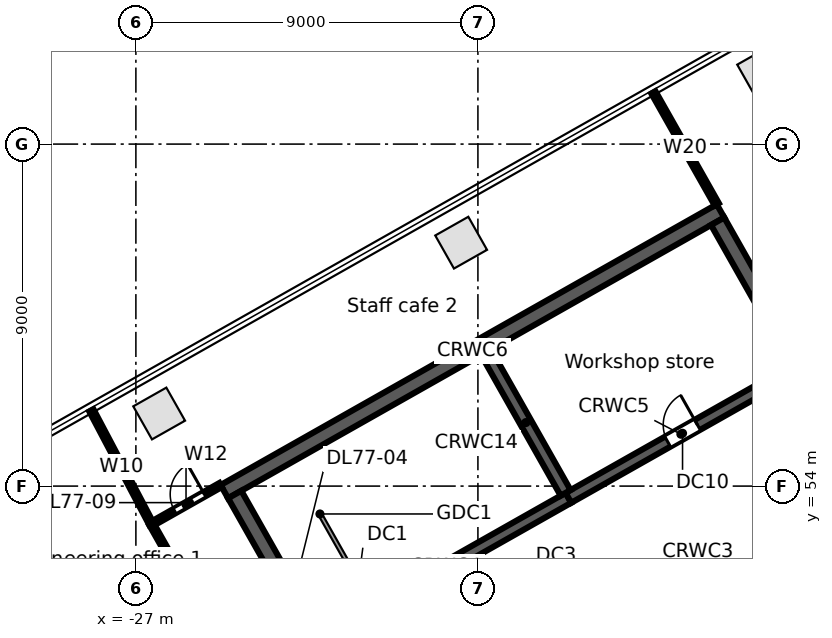
"""IFC4 building model, lengths in metres.
Left out: names, types, materials, properties, quantities, classifications, styles, units other than length and angle.
Written with IfcOpenShell. Run it as: python <this file> out.ifc"""

import sys

from ifc_helpers import new_model, si_unit, direction, frame, frame_2d, origin, origin_2d, place, context, subcontext, project, spatial, rectangle, extrude, element, fill, save


model = new_model("IFC4")
c1 = context("Model", 3, precision=1e-05, world=origin(), true_north=direction((0.0, 1.0)))
c2 = subcontext(c1, "Body", "Model", "MODEL_VIEW")
j1 = project(units=[si_unit("LENGTHUNIT", "METRE"), si_unit("PLANEANGLEUNIT", "RADIAN")], contexts=[c1])
p1 = place(None, origin())
s1 = spatial("IfcSite", under=j1, at=p1, CompositionType="ELEMENT")
p2 = place(p1, origin())
s2 = spatial("IfcBuilding", under=s1, at=p2, CompositionType="ELEMENT")
p3 = place(p2, frame((0.0, 0.0, 343.1)))
s3 = spatial("IfcBuildingStorey", under=s2, at=p3, CompositionType="ELEMENT", Elevation=343.1)
for number, where, z_axis, x_axis in (
    (1, (-10.495, 64.902, 0.0), (0.0, 0.0, 1.0), (-0.87, -0.492, 0.0)),
    (2, (-18.441, 60.406, 0.0), (0.0, 0.0, 1.0), (-0.87, -0.492, 0.0)),
    (3, (-26.388, 55.91, 0.0), (0.0, 0.0, 1.0), (-0.87, -0.492, 0.0)),
):
    element("IfcColumn", number, at=place(p3, frame(where, z_axis=z_axis, x_axis=x_axis)), inside=s3, PredefinedType="COLUMN", context=c2, shape_type="SweptSolid", body=[
        extrude(rectangle(XDim=1.0, YDim=1.0, at=origin_2d()), origin(), (0.0, 0.0, 1.0), 3.5),
    ])
p4 = place(p3, frame((-13.365, 49.911, 0.0), z_axis=(0.0, 0.0, 1.0), x_axis=(0.870347618718, 0.492437836272, 0.0)))
e4 = element("IfcWall", 4, at=p4, inside=s3, PredefinedType="SOLIDWALL", context=c2, shape_type="SweptSolid", body=[
    extrude(rectangle(XDim=6.7, YDim=0.3, at=frame_2d((3.35, 0.0))), origin(), (0.0, 0.0, 1.0), 3.5),
])
p5 = place(p4, frame((0.75, 0.0, 0.0)))
e5 = element("IfcOpeningElement", 5, at=p5, cuts=e4, PredefinedType="OPENING", context=c2, shape_type="SweptSolid", body=[
    extrude(rectangle(XDim=0.9, YDim=2.1, at=frame_2d((0.45, 1.05))), frame((0.0, 0.16, 0.0), z_axis=(0.0, -1.0, 0.0), x_axis=(1.0, 0.0, 0.0)), (0.0, 0.0, 1.0), 0.32),
])
p6 = place(p4, frame((3.15, 0.0, 0.0)))
e6 = element("IfcOpeningElement", 6, at=p6, cuts=e4, PredefinedType="OPENING", context=c2, shape_type="SweptSolid", body=[
    extrude(rectangle(XDim=0.9, YDim=2.1, at=frame_2d((0.45, 1.05))), frame((0.0, 0.16, 0.0), z_axis=(0.0, -1.0, 0.0), x_axis=(1.0, 0.0, 0.0)), (0.0, 0.0, 1.0), 0.32),
])
p7 = place(p4, frame((5.35, 0.0, 0.0)))
e7 = element("IfcOpeningElement", 7, at=p7, cuts=e4, PredefinedType="OPENING", context=c2, shape_type="SweptSolid", body=[
    extrude(rectangle(XDim=0.9, YDim=2.1, at=frame_2d((0.45, 1.05))), frame((0.0, 0.16, 0.0), z_axis=(0.0, -1.0, 0.0), x_axis=(1.0, 0.0, 0.0)), (0.0, 0.0, 1.0), 0.32),
])
p8 = place(p3, frame((-22.059, 50.047, 0.0), z_axis=(0.0, 0.0, 1.0), x_axis=(0.87035077051, 0.49243226567, 0.0)))
e8 = element("IfcWall", 8, at=p8, inside=s3, PredefinedType="SOLIDWALL", context=c2, shape_type="SweptSolid", body=[
    extrude(rectangle(XDim=7.4, YDim=0.3, at=frame_2d((3.7, 0.0))), origin(), (0.0, 0.0, 1.0), 3.5),
])
p9 = place(p8, frame((0.4, 0.0, 0.0)))
e9 = element("IfcOpeningElement", 9, at=p9, cuts=e8, PredefinedType="OPENING", context=c2, shape_type="SweptSolid", body=[
    extrude(rectangle(XDim=1.0, YDim=2.1, at=frame_2d((0.5, 1.05))), frame((0.0, 0.16, 0.0), z_axis=(0.0, -1.0, 0.0), x_axis=(1.0, 0.0, 0.0)), (0.0, 0.0, 1.0), 0.32),
])
p10 = place(p3, frame((-15.618, 53.691, 0.0), z_axis=(0.0, 0.0, 1.0), x_axis=(0.870362830851, 0.492410948978, 0.0)))
e10 = element("IfcWall", 10, at=p10, inside=s3, PredefinedType="SOLIDWALL", context=c2, shape_type="SweptSolid", body=[
    extrude(rectangle(XDim=6.8, YDim=0.3, at=frame_2d((3.4, 0.0))), origin(), (0.0, 0.0, 1.0), 3.5),
])
p11 = place(p10, frame((3.0, 0.0, 0.0)))
e11 = element("IfcOpeningElement", 11, at=p11, cuts=e10, PredefinedType="OPENING", context=c2, shape_type="SweptSolid", body=[
    extrude(rectangle(XDim=0.9, YDim=2.1, at=frame_2d((0.45, 1.05))), frame((0.0, 0.16, 0.0), z_axis=(0.0, -1.0, 0.0), x_axis=(1.0, 0.0, 0.0)), (0.0, 0.0, 1.0), 0.32),
])
p12 = place(p3, frame((-24.672, 53.854, 0.0), z_axis=(0.0, 0.0, 1.0), x_axis=(0.870353598469, 0.492427267353, 0.0)))
e12 = element("IfcWall", 12, at=p12, inside=s3, PredefinedType="SOLIDWALL", context=c2, shape_type="SweptSolid", body=[
    extrude(rectangle(XDim=15.0, YDim=0.4, at=frame_2d((7.5, 0.0))), origin(), (0.0, 0.0, 1.0), 3.5),
])
p13 = place(p3, frame((-24.4, 53.779, 0.0), z_axis=(0.0, 0.0, 1.0), x_axis=(0.492421663121, -0.870356769198, 0.0)))
e13 = element("IfcWall", 13, at=p13, inside=s3, PredefinedType="SOLIDWALL", context=c2, shape_type="SweptSolid", body=[
    extrude(rectangle(XDim=13.2, YDim=0.4, at=frame_2d((6.6, 0.0))), origin(), (0.0, 0.0, 1.0), 3.5),
])
p14 = place(p3, frame((-17.785, 57.521, 0.0), z_axis=(0.0, 0.0, 1.0), x_axis=(0.492422543467, -0.870356271124, 0.0)))
e14 = element("IfcWall", 14, at=p14, inside=s3, PredefinedType="SOLIDWALL", context=c2, shape_type="SweptSolid", body=[
    extrude(rectangle(XDim=4.25, YDim=0.3, at=frame_2d((2.125, 0.0))), origin(), (0.0, 0.0, 1.0), 3.5),
])
p15 = place(p3, frame((-11.692, 60.968, 0.0), z_axis=(0.0, 0.0, 1.0), x_axis=(0.492421663121, -0.870356769198, 0.0)))
e15 = element("IfcWall", 15, at=p15, inside=s3, PredefinedType="SOLIDWALL", context=c2, shape_type="SweptSolid", body=[
    extrude(rectangle(XDim=13.2, YDim=0.4, at=frame_2d((6.6, 0.0))), origin(), (0.0, 0.0, 1.0), 3.5),
])
p16 = place(p3, frame((-28.171, 55.993, 0.0), z_axis=(0.0, 0.0, 1.0), x_axis=(0.466919980712, -0.884299571193, 0.0)))
e16 = element("IfcWall", 16, at=p16, inside=s3, PredefinedType="PARTITIONING", context=c2, shape_type="SweptSolid", body=[
    extrude(rectangle(XDim=3.385, YDim=0.125, at=frame_2d((1.693, 0.0))), origin(), (0.0, 0.0, 1.0), 2.38),
])
p17 = place(p3, frame((-26.59, 52.999, 0.0), z_axis=(0.0, 0.0, 1.0), x_axis=(0.870384380082, 0.492372857609, 0.0)))
e17 = element("IfcWall", 17, at=p17, inside=s3, PredefinedType="PARTITIONING", context=c2, shape_type="SweptSolid", body=[
    extrude(rectangle(XDim=2.09, YDim=0.125, at=frame_2d((1.045, 0.0))), origin(), (0.0, 0.0, 1.0), 2.88),
])
p18 = place(p17, frame((0.7, 0.0, 0.0)))
e18 = element("IfcOpeningElement", 18, at=p18, cuts=e17, PredefinedType="OPENING", context=c2, shape_type="SweptSolid", body=[
    extrude(rectangle(XDim=0.9, YDim=2.1, at=frame_2d((0.45, 1.05))), frame((0.0, 0.073, 0.0), z_axis=(0.0, -1.0, 0.0), x_axis=(1.0, 0.0, 0.0)), (0.0, 0.0, 1.0), 0.145),
])
p19 = place(p3, frame((-26.59, 52.999, 0.0), z_axis=(0.0, 0.0, 1.0), x_axis=(0.492406341242, -0.870365437678, 0.0)))
e19 = element("IfcWall", 19, at=p19, inside=s3, PredefinedType="PARTITIONING", context=c2, shape_type="SweptSolid", body=[
    extrude(rectangle(XDim=5.0, YDim=0.125, at=frame_2d((2.5, 0.0))), origin(), (0.0, 0.0, 1.0), 3.5),
])
p20 = place(p19, frame((1.95, 0.0, 0.0)))
e20 = element("IfcOpeningElement", 20, at=p20, cuts=e19, PredefinedType="OPENING", context=c2, shape_type="SweptSolid", body=[
    extrude(rectangle(XDim=0.9, YDim=2.1, at=frame_2d((0.45, 1.05))), frame((0.0, 0.073, 0.0), z_axis=(0.0, -1.0, 0.0), x_axis=(1.0, 0.0, 0.0)), (0.0, 0.0, 1.0), 0.145),
])
p21 = place(p3, frame((-13.382, 64.36, 0.0), z_axis=(0.0, 0.0, 1.0), x_axis=(0.492468354667, -0.870330350874, 0.0)))
e21 = element("IfcWall", 21, at=p21, inside=s3, PredefinedType="PARTITIONING", context=c2, shape_type="SweptSolid", body=[
    extrude(rectangle(XDim=3.385, YDim=0.125, at=frame_2d((1.692, 0.0))), origin(), (0.0, 0.0, 1.0), 2.38),
])
p22 = place(p11, origin())
e22 = element("IfcDoor", 22, at=p22, inside=s3, OperationType="SINGLE_SWING_RIGHT", PredefinedType="DOOR", context=c2, shape_type="SweptSolid", body=[
    extrude(rectangle(XDim=0.9, YDim=2.1, at=frame_2d((0.45, 1.05))), frame((0.0, 0.025, 0.0), z_axis=(0.0, -1.0, 0.0), x_axis=(1.0, 0.0, 0.0)), (0.0, 0.0, 1.0), 0.05),
])
fill(e11, e22)
p23 = place(p18, origin())
e23 = element("IfcDoor", 23, at=p23, inside=s3, OperationType="SINGLE_SWING_RIGHT", PredefinedType="DOOR", context=c2, shape_type="SweptSolid", body=[
    extrude(rectangle(XDim=0.9, YDim=2.1, at=frame_2d((0.45, 1.05))), frame((0.0, 0.025, 0.0), z_axis=(0.0, -1.0, 0.0), x_axis=(1.0, 0.0, 0.0)), (0.0, 0.0, 1.0), 0.05),
])
fill(e18, e23)
save(model, sys.argv[1])
